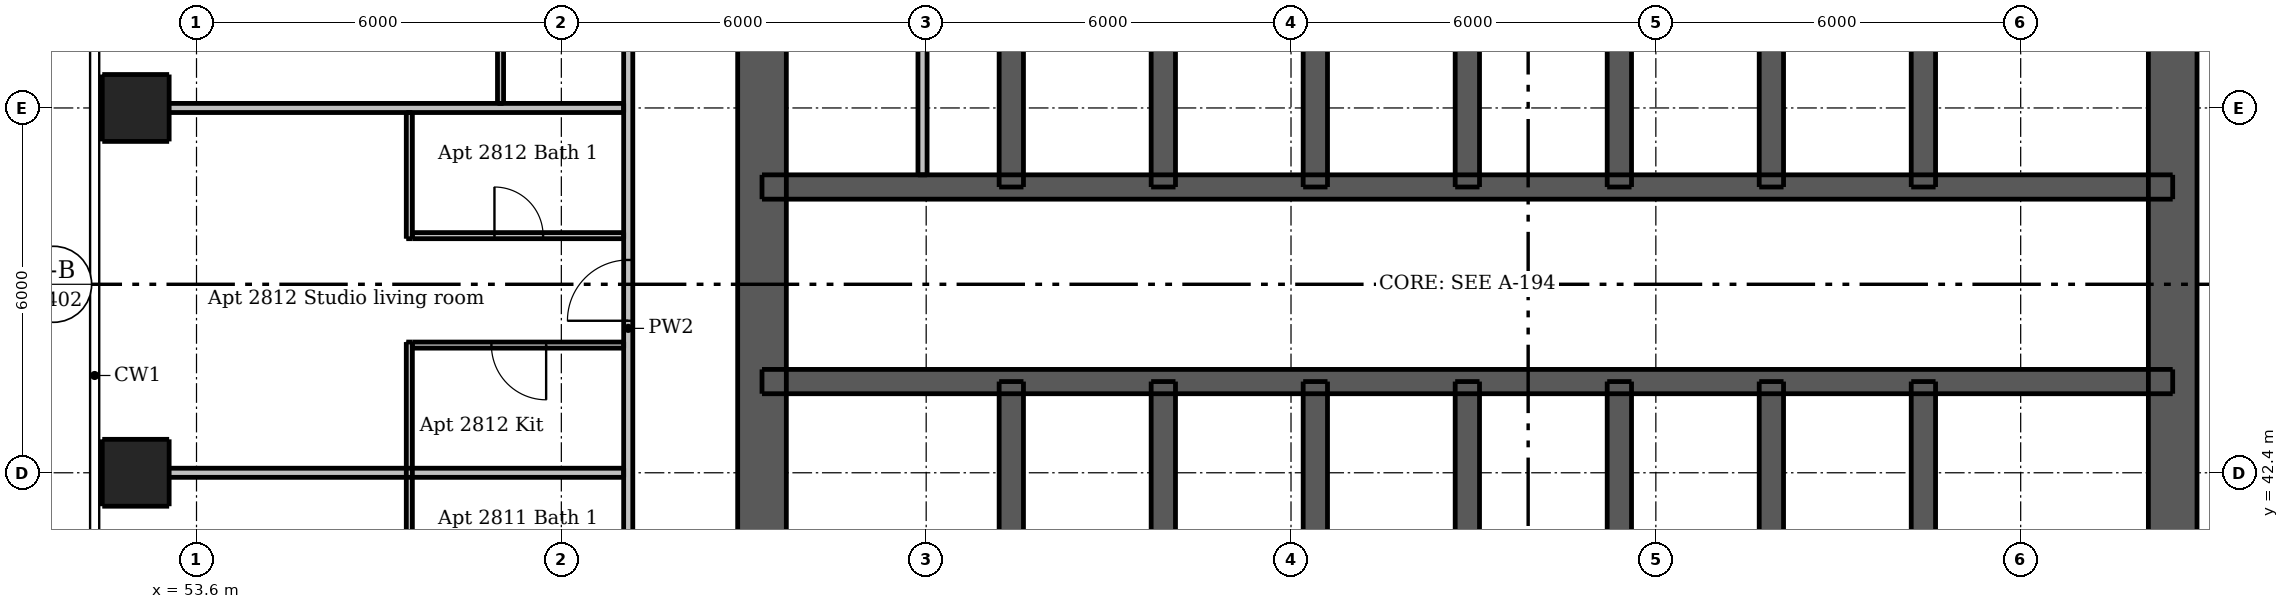
"""IFC4 building model, lengths in metres.
Left out: names, types, materials, properties, quantities, classifications, styles, units other than length and angle.
Written with IfcOpenShell. Run it as: python <this file> out.ifc"""

import sys

from ifc_helpers import new_model, si_unit, direction, frame, frame_2d, origin, origin_2d, place, context, subcontext, project, spatial, rectangle, extrude, element, fill, save


model = new_model("IFC4")
c1 = context("Model", 3, precision=1e-05, world=origin(), true_north=direction((0.0, 1.0)))
c2 = subcontext(c1, "Body", "Model", "MODEL_VIEW")
j1 = project(units=[si_unit("LENGTHUNIT", "METRE"), si_unit("PLANEANGLEUNIT", "RADIAN")], contexts=[c1])
p1 = place(None, origin())
s1 = spatial("IfcSite", under=j1, at=p1, CompositionType="ELEMENT")
p2 = place(p1, origin())
s2 = spatial("IfcBuilding", under=s1, at=p2, CompositionType="ELEMENT")
p3 = place(p2, frame((0.0, 0.0, 105.1)))
s3 = spatial("IfcBuildingStorey", under=s2, at=p3, CompositionType="ELEMENT", Elevation=105.1)
p4 = place(p3, frame((62.9, 33.5, 0.0), z_axis=(0.0, 0.0, 1.0), x_axis=(0.0, 1.0, 0.0)))
e1 = element("IfcWall", 1, at=p4, inside=s3, PredefinedType="SHEAR", context=c2, shape_type="SweptSolid", body=[
    extrude(rectangle(XDim=24.0, YDim=0.8, at=frame_2d((12.0, 0.0))), origin(), (0.0, 0.0, 1.0), 3.05),
])
p5 = place(p4, frame((11.2, 0.0, 0.0)))
e2 = element("IfcOpeningElement", 2, at=p5, cuts=e1, PredefinedType="OPENING", context=c2, shape_type="SweptSolid", body=[
    extrude(rectangle(XDim=1.6, YDim=2.1, at=frame_2d((0.8, 1.05))), frame((0.0, 0.41, 0.0), z_axis=(0.0, -1.0, 0.0), x_axis=(1.0, 0.0, 0.0)), (0.0, 0.0, 1.0), 0.82),
])
p6 = place(p3, frame((86.1, 33.5, 0.0), z_axis=(0.0, 0.0, 1.0), x_axis=(0.0, 1.0, 0.0)))
e3 = element("IfcWall", 3, at=p6, inside=s3, PredefinedType="SHEAR", context=c2, shape_type="SweptSolid", body=[
    extrude(rectangle(XDim=24.0, YDim=0.8, at=frame_2d((12.0, 0.0))), origin(), (0.0, 0.0, 1.0), 3.05),
])
p7 = place(p6, frame((11.2, 0.0, 0.0)))
e4 = element("IfcOpeningElement", 4, at=p7, cuts=e3, PredefinedType="OPENING", context=c2, shape_type="SweptSolid", body=[
    extrude(rectangle(XDim=1.6, YDim=2.1, at=frame_2d((0.8, 1.05))), frame((0.0, 0.41, 0.0), z_axis=(0.0, -1.0, 0.0), x_axis=(1.0, 0.0, 0.0)), (0.0, 0.0, 1.0), 0.82),
])
p8 = place(p3, frame((62.9, 43.9, 0.0), z_axis=(0.0, 0.0, 1.0), x_axis=(1.0, 0.0, 0.0)))
e5 = element("IfcWall", 5, at=p8, inside=s3, PredefinedType="SHEAR", context=c2, shape_type="SweptSolid", body=[
    extrude(rectangle(XDim=23.2, YDim=0.4, at=frame_2d((11.6, 0.0))), origin(), (0.0, 0.0, 1.0), 3.05),
])
p9 = place(p8, frame((1.7, 0.0, 0.0)))
e6 = element("IfcOpeningElement", 6, at=p9, cuts=e5, PredefinedType="OPENING", context=c2, shape_type="SweptSolid", body=[
    extrude(rectangle(XDim=0.9, YDim=2.1, at=frame_2d((0.45, 1.05))), frame((0.0, 0.21, 0.0), z_axis=(0.0, -1.0, 0.0), x_axis=(1.0, 0.0, 0.0)), (0.0, 0.0, 1.0), 0.42),
])
p10 = place(p8, frame((20.6, 0.0, 0.0)))
e7 = element("IfcOpeningElement", 7, at=p10, cuts=e5, PredefinedType="OPENING", context=c2, shape_type="SweptSolid", body=[
    extrude(rectangle(XDim=0.9, YDim=2.1, at=frame_2d((0.45, 1.05))), frame((0.0, 0.21, 0.0), z_axis=(0.0, -1.0, 0.0), x_axis=(1.0, 0.0, 0.0)), (0.0, 0.0, 1.0), 0.42),
])
p11 = place(p8, frame((4.8, 0.0, 0.0)))
e8 = element("IfcOpeningElement", 8, at=p11, cuts=e5, PredefinedType="OPENING", context=c2, shape_type="SweptSolid", body=[
    extrude(rectangle(XDim=1.1, YDim=2.1, at=frame_2d((0.55, 1.05))), frame((0.0, 0.21, 0.0), z_axis=(0.0, -1.0, 0.0), x_axis=(1.0, 0.0, 0.0)), (0.0, 0.0, 1.0), 0.42),
])
p12 = place(p8, frame((7.3, 0.0, 0.0)))
e9 = element("IfcOpeningElement", 9, at=p12, cuts=e5, PredefinedType="OPENING", context=c2, shape_type="SweptSolid", body=[
    extrude(rectangle(XDim=1.1, YDim=2.1, at=frame_2d((0.55, 1.05))), frame((0.0, 0.21, 0.0), z_axis=(0.0, -1.0, 0.0), x_axis=(1.0, 0.0, 0.0)), (0.0, 0.0, 1.0), 0.42),
])
p13 = place(p8, frame((9.8, 0.0, 0.0)))
e10 = element("IfcOpeningElement", 10, at=p13, cuts=e5, PredefinedType="OPENING", context=c2, shape_type="SweptSolid", body=[
    extrude(rectangle(XDim=1.1, YDim=2.1, at=frame_2d((0.55, 1.05))), frame((0.0, 0.21, 0.0), z_axis=(0.0, -1.0, 0.0), x_axis=(1.0, 0.0, 0.0)), (0.0, 0.0, 1.0), 0.42),
])
p14 = place(p8, frame((12.3, 0.0, 0.0)))
e11 = element("IfcOpeningElement", 11, at=p14, cuts=e5, PredefinedType="OPENING", context=c2, shape_type="SweptSolid", body=[
    extrude(rectangle(XDim=1.1, YDim=2.1, at=frame_2d((0.55, 1.05))), frame((0.0, 0.21, 0.0), z_axis=(0.0, -1.0, 0.0), x_axis=(1.0, 0.0, 0.0)), (0.0, 0.0, 1.0), 0.42),
])
p15 = place(p8, frame((14.8, 0.0, 0.0)))
e12 = element("IfcOpeningElement", 12, at=p15, cuts=e5, PredefinedType="OPENING", context=c2, shape_type="SweptSolid", body=[
    extrude(rectangle(XDim=1.1, YDim=2.1, at=frame_2d((0.55, 1.05))), frame((0.0, 0.21, 0.0), z_axis=(0.0, -1.0, 0.0), x_axis=(1.0, 0.0, 0.0)), (0.0, 0.0, 1.0), 0.42),
])
p16 = place(p8, frame((17.3, 0.0, 0.0)))
e13 = element("IfcOpeningElement", 13, at=p16, cuts=e5, PredefinedType="OPENING", context=c2, shape_type="SweptSolid", body=[
    extrude(rectangle(XDim=1.1, YDim=2.1, at=frame_2d((0.55, 1.05))), frame((0.0, 0.21, 0.0), z_axis=(0.0, -1.0, 0.0), x_axis=(1.0, 0.0, 0.0)), (0.0, 0.0, 1.0), 0.42),
])
p17 = place(p3, frame((62.9, 47.1, 0.0), z_axis=(0.0, 0.0, 1.0), x_axis=(1.0, 0.0, 0.0)))
e14 = element("IfcWall", 14, at=p17, inside=s3, PredefinedType="SHEAR", context=c2, shape_type="SweptSolid", body=[
    extrude(rectangle(XDim=23.2, YDim=0.4, at=frame_2d((11.6, 0.0))), origin(), (0.0, 0.0, 1.0), 3.05),
])
p18 = place(p17, frame((1.07, 0.0, 0.0)))
e15 = element("IfcOpeningElement", 15, at=p18, cuts=e14, PredefinedType="OPENING", context=c2, shape_type="SweptSolid", body=[
    extrude(rectangle(XDim=0.9, YDim=2.1, at=frame_2d((0.45, 1.05))), frame((0.0, 0.21, 0.0), z_axis=(0.0, -1.0, 0.0), x_axis=(1.0, 0.0, 0.0)), (0.0, 0.0, 1.0), 0.42),
])
p19 = place(p17, frame((2.87, 0.0, 0.0)))
e16 = element("IfcOpeningElement", 16, at=p19, cuts=e14, PredefinedType="OPENING", context=c2, shape_type="SweptSolid", body=[
    extrude(rectangle(XDim=0.8, YDim=2.1, at=frame_2d((0.4, 1.05))), frame((0.0, 0.21, 0.0), z_axis=(0.0, -1.0, 0.0), x_axis=(1.0, 0.0, 0.0)), (0.0, 0.0, 1.0), 0.42),
])
p20 = place(p17, frame((20.6, 0.0, 0.0)))
e17 = element("IfcOpeningElement", 17, at=p20, cuts=e14, PredefinedType="OPENING", context=c2, shape_type="SweptSolid", body=[
    extrude(rectangle(XDim=0.9, YDim=2.1, at=frame_2d((0.45, 1.05))), frame((0.0, 0.21, 0.0), z_axis=(0.0, -1.0, 0.0), x_axis=(1.0, 0.0, 0.0)), (0.0, 0.0, 1.0), 0.42),
])
p21 = place(p3, frame((67.0, 33.9, 0.0), z_axis=(0.0, 0.0, 1.0), x_axis=(0.0, 1.0, 0.0)))
e18 = element("IfcWall", 18, at=p21, inside=s3, PredefinedType="SHEAR", context=c2, shape_type="SweptSolid", body=[
    extrude(rectangle(XDim=10.0, YDim=0.4, at=frame_2d((5.0, 0.0))), origin(), (0.0, 0.0, 1.0), 3.05),
])
p22 = place(p21, frame((0.6, 0.0, 0.0)))
e19 = element("IfcOpeningElement", 19, at=p22, cuts=e18, PredefinedType="OPENING", context=c2, shape_type="SweptSolid", body=[
    extrude(rectangle(XDim=1.1, YDim=2.1, at=frame_2d((0.55, 1.05))), frame((0.0, 0.21, 0.0), z_axis=(0.0, -1.0, 0.0), x_axis=(1.0, 0.0, 0.0)), (0.0, 0.0, 1.0), 0.42),
])
for number, where, z_axis, x_axis in (
    (20, (67.0, 47.1, 0.0), (0.0, 0.0, 1.0), (0.0, 1.0, 0.0)),
    (21, (82.0, 33.9, 0.0), (0.0, 0.0, 1.0), (0.0, 1.0, 0.0)),
    (22, (82.0, 47.1, 0.0), (0.0, 0.0, 1.0), (0.0, 1.0, 0.0)),
):
    element("IfcWall", number, at=place(p3, frame(where, z_axis=z_axis, x_axis=x_axis)), inside=s3, PredefinedType="SHEAR", context=c2, shape_type="SweptSolid", body=[
        extrude(rectangle(XDim=10.0, YDim=0.4, at=frame_2d((5.0, 0.0))), origin(), (0.0, 0.0, 1.0), 3.05),
    ])
for number, where, z_axis, x_axis in (
    (23, (69.5, 41.0, 0.0), (0.0, 0.0, 1.0), (0.0, 1.0, 0.0)),
    (24, (69.5, 47.1, 0.0), (0.0, 0.0, 1.0), (0.0, 1.0, 0.0)),
    (25, (72.0, 41.0, 0.0), (0.0, 0.0, 1.0), (0.0, 1.0, 0.0)),
    (26, (72.0, 47.1, 0.0), (0.0, 0.0, 1.0), (0.0, 1.0, 0.0)),
    (27, (74.5, 41.0, 0.0), (0.0, 0.0, 1.0), (0.0, 1.0, 0.0)),
    (28, (74.5, 47.1, 0.0), (0.0, 0.0, 1.0), (0.0, 1.0, 0.0)),
    (29, (77.0, 41.0, 0.0), (0.0, 0.0, 1.0), (0.0, 1.0, 0.0)),
    (30, (77.0, 47.1, 0.0), (0.0, 0.0, 1.0), (0.0, 1.0, 0.0)),
    (31, (79.5, 41.0, 0.0), (0.0, 0.0, 1.0), (0.0, 1.0, 0.0)),
    (32, (79.5, 47.1, 0.0), (0.0, 0.0, 1.0), (0.0, 1.0, 0.0)),
):
    element("IfcWall", number, at=place(p3, frame(where, z_axis=z_axis, x_axis=x_axis)), inside=s3, PredefinedType="SHEAR", context=c2, shape_type="SweptSolid", body=[
        extrude(rectangle(XDim=2.9, YDim=0.4, at=frame_2d((1.45, 0.0))), origin(), (0.0, 0.0, 1.0), 3.05),
    ])
for number, where, z_axis, x_axis in (
    (33, (52.6, 42.4, 0.0), (0.0, 0.0, 1.0), (1.0, 0.0, 0.0)),
    (34, (52.6, 48.4, 0.0), (0.0, 0.0, 1.0), (1.0, 0.0, 0.0)),
):
    element("IfcColumn", number, at=place(p3, frame(where, z_axis=z_axis, x_axis=x_axis)), inside=s3, PredefinedType="COLUMN", context=c2, shape_type="SweptSolid", body=[
        extrude(rectangle(XDim=1.1, YDim=1.1, at=origin_2d()), origin(), (0.0, 0.0, 1.0), 3.05),
    ])
p23 = place(p3, frame((65.54, 47.3, 0.0), z_axis=(0.0, 0.0, 1.0), x_axis=(0.0, 1.0, 0.0)))
e35 = element("IfcWall", 35, at=p23, inside=s3, PredefinedType="PLUMBINGWALL", context=c2, shape_type="SweptSolid", body=[
    extrude(rectangle(XDim=2.5, YDim=0.15, at=frame_2d((1.25, 0.0))), origin(), (0.0, 0.0, 1.0), 3.05),
])
p24 = place(p3, frame((57.1, 40.25, 0.0), z_axis=(0.0, 0.0, 1.0), x_axis=(0.0, 1.0, 0.0)))
e36 = element("IfcWall", 36, at=p24, inside=s3, PredefinedType="PARTITIONING", context=c2, shape_type="SweptSolid", body=[
    extrude(rectangle(XDim=4.3, YDim=0.1, at=frame_2d((2.15, 0.0))), origin(), (0.0, 0.0, 1.0), 3.05),
])
p25 = place(p3, frame((57.1, 46.25, 0.0), z_axis=(0.0, 0.0, 1.0), x_axis=(0.0, 1.0, 0.0)))
e37 = element("IfcWall", 37, at=p25, inside=s3, PredefinedType="PARTITIONING", context=c2, shape_type="SweptSolid", body=[
    extrude(rectangle(XDim=2.075, YDim=0.1, at=frame_2d((1.038, 0.0))), origin(), (0.0, 0.0, 1.0), 3.05),
])
p26 = place(p3, frame((58.6, 54.35, 0.0), z_axis=(0.0, 0.0, 1.0), x_axis=(0.0, -1.0, 0.0)))
e38 = element("IfcWall", 38, at=p26, inside=s3, PredefinedType="PARTITIONING", context=c2, shape_type="SweptSolid", body=[
    extrude(rectangle(XDim=5.875, YDim=0.1, at=frame_2d((2.938, 0.0))), origin(), (0.0, 0.0, 1.0), 3.05),
])
p27 = place(p26, frame((3.75, 0.0, 0.0)))
e39 = element("IfcOpeningElement", 39, at=p27, cuts=e38, PredefinedType="OPENING", context=c2, shape_type="SweptSolid", body=[
    extrude(rectangle(XDim=0.8, YDim=2.1, at=frame_2d((0.4, 1.05))), frame((0.0, 0.06, 0.0), z_axis=(0.0, -1.0, 0.0), x_axis=(1.0, 0.0, 0.0)), (0.0, 0.0, 1.0), 0.12),
])
p28 = place(p3, frame((57.15, 46.3, 0.0), z_axis=(0.0, 0.0, 1.0), x_axis=(1.0, 0.0, 0.0)))
e40 = element("IfcWall", 40, at=p28, inside=s3, PredefinedType="PARTITIONING", context=c2, shape_type="SweptSolid", body=[
    extrude(rectangle(XDim=3.475, YDim=0.1, at=frame_2d((1.738, 0.0))), origin(), (0.0, 0.0, 1.0), 3.05),
])
p29 = place(p28, frame((1.35, 0.0, 0.0)))
e41 = element("IfcOpeningElement", 41, at=p29, cuts=e40, PredefinedType="OPENING", context=c2, shape_type="SweptSolid", body=[
    extrude(rectangle(XDim=0.8, YDim=2.1, at=frame_2d((0.4, 1.05))), frame((0.0, 0.06, 0.0), z_axis=(0.0, -1.0, 0.0), x_axis=(1.0, 0.0, 0.0)), (0.0, 0.0, 1.0), 0.12),
])
p30 = place(p3, frame((60.625, 44.5, 0.0), z_axis=(0.0, 0.0, 1.0), x_axis=(-1.0, 0.0, 0.0)))
e42 = element("IfcWall", 42, at=p30, inside=s3, PredefinedType="PARTITIONING", context=c2, shape_type="SweptSolid", body=[
    extrude(rectangle(XDim=3.475, YDim=0.1, at=frame_2d((1.738, 0.0))), origin(), (0.0, 0.0, 1.0), 3.05),
])
p31 = place(p30, frame((1.275, 0.0, 0.0)))
e43 = element("IfcOpeningElement", 43, at=p31, cuts=e42, PredefinedType="OPENING", context=c2, shape_type="SweptSolid", body=[
    extrude(rectangle(XDim=0.9, YDim=2.1, at=frame_2d((0.45, 1.05))), frame((0.0, 0.06, 0.0), z_axis=(0.0, -1.0, 0.0), x_axis=(1.0, 0.0, 0.0)), (0.0, 0.0, 1.0), 0.12),
])
p32 = place(p3, frame((60.7, 30.325, 0.0), z_axis=(0.0, 0.0, 1.0), x_axis=(0.0, 1.0, 0.0)))
e44 = element("IfcWall", 44, at=p32, inside=s3, PredefinedType="PARTITIONING", context=c2, shape_type="SweptSolid", body=[
    extrude(rectangle(XDim=28.9, YDim=0.15, at=frame_2d((14.45, 0.0))), origin(), (0.0, 0.0, 1.0), 3.05),
])
p33 = place(p32, frame((2.575, 0.0, 0.0)))
e45 = element("IfcOpeningElement", 45, at=p33, cuts=e44, PredefinedType="OPENING", context=c2, shape_type="SweptSolid", body=[
    extrude(rectangle(XDim=1.0, YDim=2.1, at=frame_2d((0.5, 1.05))), frame((0.0, 0.085, 0.0), z_axis=(0.0, -1.0, 0.0), x_axis=(1.0, 0.0, 0.0)), (0.0, 0.0, 1.0), 0.17),
])
p34 = place(p32, frame((8.575, 0.0, 0.0)))
e46 = element("IfcOpeningElement", 46, at=p34, cuts=e44, PredefinedType="OPENING", context=c2, shape_type="SweptSolid", body=[
    extrude(rectangle(XDim=1.0, YDim=2.1, at=frame_2d((0.5, 1.05))), frame((0.0, 0.085, 0.0), z_axis=(0.0, -1.0, 0.0), x_axis=(1.0, 0.0, 0.0)), (0.0, 0.0, 1.0), 0.17),
])
p35 = place(p32, frame((14.575, 0.0, 0.0)))
e47 = element("IfcOpeningElement", 47, at=p35, cuts=e44, PredefinedType="OPENING", context=c2, shape_type="SweptSolid", body=[
    extrude(rectangle(XDim=1.0, YDim=2.1, at=frame_2d((0.5, 1.05))), frame((0.0, 0.085, 0.0), z_axis=(0.0, -1.0, 0.0), x_axis=(1.0, 0.0, 0.0)), (0.0, 0.0, 1.0), 0.17),
])
p36 = place(p32, frame((26.025, 0.0, 0.0)))
e48 = element("IfcOpeningElement", 48, at=p36, cuts=e44, PredefinedType="OPENING", context=c2, shape_type="SweptSolid", body=[
    extrude(rectangle(XDim=1.0, YDim=2.1, at=frame_2d((0.5, 1.05))), frame((0.0, 0.085, 0.0), z_axis=(0.0, -1.0, 0.0), x_axis=(1.0, 0.0, 0.0)), (0.0, 0.0, 1.0), 0.17),
])
for number, where, z_axis, x_axis in (
    (49, (52.0, 48.4, 0.0), (0.0, 0.0, 1.0), (1.0, 0.0, 0.0)),
    (50, (52.0, 42.4, 0.0), (0.0, 0.0, 1.0), (1.0, 0.0, 0.0)),
):
    element("IfcWall", number, at=place(p3, frame(where, z_axis=z_axis, x_axis=x_axis)), inside=s3, PredefinedType="PARTITIONING", context=c2, shape_type="SweptSolid", body=[
        extrude(rectangle(XDim=8.625, YDim=0.15, at=frame_2d((4.312, 0.0))), origin(), (0.0, 0.0, 1.0), 2.516),
    ])
p37 = place(p5, origin())
e51 = element("IfcDoor", 51, at=p37, inside=s3, OperationType="DOUBLE_DOOR_SINGLE_SWING", PredefinedType="DOOR", context=c2, shape_type="SweptSolid", body=[
    extrude(rectangle(XDim=1.6, YDim=2.1, at=frame_2d((0.8, 1.05))), frame((0.0, -0.337, 0.0), z_axis=(0.0, -1.0, 0.0), x_axis=(1.0, 0.0, 0.0)), (0.0, 0.0, 1.0), 0.05),
])
fill(e2, e51)
p38 = place(p7, origin())
e52 = element("IfcDoor", 52, at=p38, inside=s3, OperationType="DOUBLE_DOOR_SINGLE_SWING", PredefinedType="DOOR", context=c2, shape_type="SweptSolid", body=[
    extrude(rectangle(XDim=1.6, YDim=2.1, at=frame_2d((0.8, 1.05))), frame((0.0, 0.388, 0.0), z_axis=(0.0, -1.0, 0.0), x_axis=(1.0, 0.0, 0.0)), (0.0, 0.0, 1.0), 0.05),
])
fill(e4, e52)
p39 = place(p9, origin())
e53 = element("IfcDoor", 53, at=p39, inside=s3, OperationType="SINGLE_SWING_LEFT", PredefinedType="DOOR", context=c2, shape_type="SweptSolid", body=[
    extrude(rectangle(XDim=0.9, YDim=2.1, at=frame_2d((0.45, 1.05))), frame((0.0, -0.138, 0.0), z_axis=(0.0, -1.0, 0.0), x_axis=(1.0, 0.0, 0.0)), (0.0, 0.0, 1.0), 0.05),
])
fill(e6, e53)
p40 = place(p10, origin())
e54 = element("IfcDoor", 54, at=p40, inside=s3, OperationType="SINGLE_SWING_LEFT", PredefinedType="DOOR", context=c2, shape_type="SweptSolid", body=[
    extrude(rectangle(XDim=0.9, YDim=2.1, at=frame_2d((0.45, 1.05))), frame((0.0, -0.138, 0.0), z_axis=(0.0, -1.0, 0.0), x_axis=(1.0, 0.0, 0.0)), (0.0, 0.0, 1.0), 0.05),
])
fill(e7, e54)
p41 = place(p18, origin())
e55 = element("IfcDoor", 55, at=p41, inside=s3, OperationType="SINGLE_SWING_LEFT", PredefinedType="DOOR", context=c2, shape_type="SweptSolid", body=[
    extrude(rectangle(XDim=0.9, YDim=2.1, at=frame_2d((0.45, 1.05))), frame((0.0, 0.188, 0.0), z_axis=(0.0, -1.0, 0.0), x_axis=(1.0, 0.0, 0.0)), (0.0, 0.0, 1.0), 0.05),
])
fill(e15, e55)
p42 = place(p19, origin())
e56 = element("IfcDoor", 56, at=p42, inside=s3, OperationType="SINGLE_SWING_RIGHT", PredefinedType="DOOR", context=c2, shape_type="SweptSolid", body=[
    extrude(rectangle(XDim=0.8, YDim=2.1, at=frame_2d((0.4, 1.05))), frame((0.0, 0.188, 0.0), z_axis=(0.0, -1.0, 0.0), x_axis=(1.0, 0.0, 0.0)), (0.0, 0.0, 1.0), 0.05),
])
fill(e16, e56)
p43 = place(p20, origin())
e57 = element("IfcDoor", 57, at=p43, inside=s3, OperationType="SINGLE_SWING_LEFT", PredefinedType="DOOR", context=c2, shape_type="SweptSolid", body=[
    extrude(rectangle(XDim=0.9, YDim=2.1, at=frame_2d((0.45, 1.05))), frame((0.0, 0.188, 0.0), z_axis=(0.0, -1.0, 0.0), x_axis=(1.0, 0.0, 0.0)), (0.0, 0.0, 1.0), 0.05),
])
fill(e17, e57)
p44 = place(p11, origin())
e58 = element("IfcDoor", 58, at=p44, inside=s3, OperationType="DOUBLE_DOOR_SLIDING", PredefinedType="DOOR", context=c2, shape_type="SweptSolid", body=[
    extrude(rectangle(XDim=1.1, YDim=2.1, at=frame_2d((0.55, 1.05))), frame((0.0, 0.025, 0.0), z_axis=(0.0, -1.0, 0.0), x_axis=(1.0, 0.0, 0.0)), (0.0, 0.0, 1.0), 0.05),
])
fill(e8, e58)
p45 = place(p12, origin())
e59 = element("IfcDoor", 59, at=p45, inside=s3, OperationType="DOUBLE_DOOR_SLIDING", PredefinedType="DOOR", context=c2, shape_type="SweptSolid", body=[
    extrude(rectangle(XDim=1.1, YDim=2.1, at=frame_2d((0.55, 1.05))), frame((0.0, 0.025, 0.0), z_axis=(0.0, -1.0, 0.0), x_axis=(1.0, 0.0, 0.0)), (0.0, 0.0, 1.0), 0.05),
])
fill(e9, e59)
p46 = place(p13, origin())
e60 = element("IfcDoor", 60, at=p46, inside=s3, OperationType="DOUBLE_DOOR_SLIDING", PredefinedType="DOOR", context=c2, shape_type="SweptSolid", body=[
    extrude(rectangle(XDim=1.1, YDim=2.1, at=frame_2d((0.55, 1.05))), frame((0.0, 0.025, 0.0), z_axis=(0.0, -1.0, 0.0), x_axis=(1.0, 0.0, 0.0)), (0.0, 0.0, 1.0), 0.05),
])
fill(e10, e60)
p47 = place(p14, origin())
e61 = element("IfcDoor", 61, at=p47, inside=s3, OperationType="DOUBLE_DOOR_SLIDING", PredefinedType="DOOR", context=c2, shape_type="SweptSolid", body=[
    extrude(rectangle(XDim=1.1, YDim=2.1, at=frame_2d((0.55, 1.05))), frame((0.0, 0.025, 0.0), z_axis=(0.0, -1.0, 0.0), x_axis=(1.0, 0.0, 0.0)), (0.0, 0.0, 1.0), 0.05),
])
fill(e11, e61)
p48 = place(p15, origin())
e62 = element("IfcDoor", 62, at=p48, inside=s3, OperationType="DOUBLE_DOOR_SLIDING", PredefinedType="DOOR", context=c2, shape_type="SweptSolid", body=[
    extrude(rectangle(XDim=1.1, YDim=2.1, at=frame_2d((0.55, 1.05))), frame((0.0, 0.025, 0.0), z_axis=(0.0, -1.0, 0.0), x_axis=(1.0, 0.0, 0.0)), (0.0, 0.0, 1.0), 0.05),
])
fill(e12, e62)
p49 = place(p16, origin())
e63 = element("IfcDoor", 63, at=p49, inside=s3, OperationType="DOUBLE_DOOR_SLIDING", PredefinedType="DOOR", context=c2, shape_type="SweptSolid", body=[
    extrude(rectangle(XDim=1.1, YDim=2.1, at=frame_2d((0.55, 1.05))), frame((0.0, 0.025, 0.0), z_axis=(0.0, -1.0, 0.0), x_axis=(1.0, 0.0, 0.0)), (0.0, 0.0, 1.0), 0.05),
])
fill(e13, e63)
p50 = place(p35, origin())
e64 = element("IfcDoor", 64, at=p50, inside=s3, OperationType="SINGLE_SWING_LEFT", PredefinedType="DOOR", context=c2, shape_type="SweptSolid", body=[
    extrude(rectangle(XDim=1.0, YDim=2.1, at=frame_2d((0.5, 1.05))), frame((0.0, 0.025, 0.0), z_axis=(0.0, -1.0, 0.0), x_axis=(1.0, 0.0, 0.0)), (0.0, 0.0, 1.0), 0.05),
])
fill(e47, e64)
p51 = place(p31, origin())
e65 = element("IfcDoor", 65, at=p51, inside=s3, OperationType="SINGLE_SWING_LEFT", PredefinedType="DOOR", context=c2, shape_type="SweptSolid", body=[
    extrude(rectangle(XDim=0.9, YDim=2.1, at=frame_2d((0.45, 1.05))), frame((0.0, 0.025, 0.0), z_axis=(0.0, -1.0, 0.0), x_axis=(1.0, 0.0, 0.0)), (0.0, 0.0, 1.0), 0.05),
])
fill(e43, e65)
p52 = place(p29, origin())
e66 = element("IfcDoor", 66, at=p52, inside=s3, OperationType="SINGLE_SWING_LEFT", PredefinedType="DOOR", context=c2, shape_type="SweptSolid", body=[
    extrude(rectangle(XDim=0.8, YDim=2.1, at=frame_2d((0.4, 1.05))), frame((0.0, 0.025, 0.0), z_axis=(0.0, -1.0, 0.0), x_axis=(1.0, 0.0, 0.0)), (0.0, 0.0, 1.0), 0.05),
])
fill(e41, e66)
save(model, sys.argv[1])
